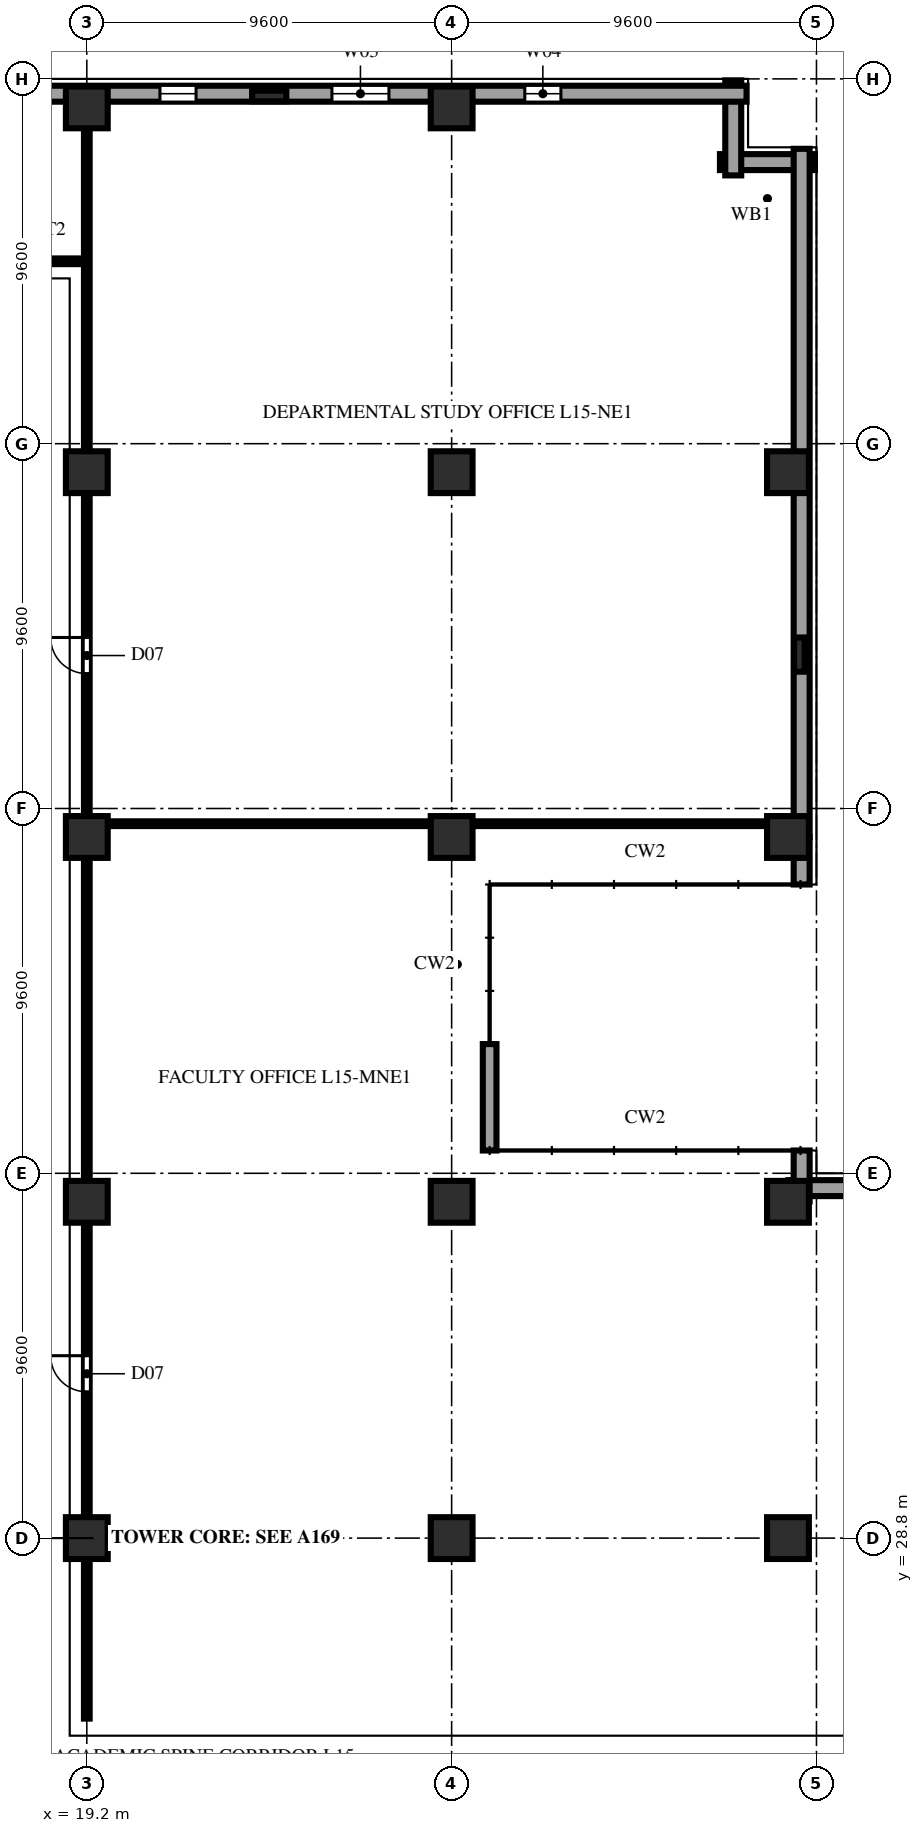
"""IFC4 building model, lengths in metres.
Left out: names, types, materials, properties, quantities, classifications, styles, units other than length and angle.
Written with IfcOpenShell. Run it as: python <this file> out.ifc"""

import sys

from ifc_helpers import new_model, si_unit, direction, frame, frame_2d, origin, origin_2d, place, context, subcontext, project, spatial, rectangle, extrude, element, fill, save


model = new_model("IFC4")
c1 = context("Model", 3, precision=1e-05, world=origin(), true_north=direction((0.0, 1.0)))
c2 = subcontext(c1, "Body", "Model", "MODEL_VIEW")
j1 = project(units=[si_unit("LENGTHUNIT", "METRE"), si_unit("PLANEANGLEUNIT", "RADIAN")], contexts=[c1])
p1 = place(None, origin())
s1 = spatial("IfcSite", under=j1, at=p1, CompositionType="ELEMENT")
p2 = place(p1, origin())
s2 = spatial("IfcBuilding", under=s1, at=p2, CompositionType="ELEMENT")
p3 = place(p2, frame((0.0, 0.0, 62.2)))
s3 = spatial("IfcBuildingStorey", under=s2, at=p3, CompositionType="ELEMENT", Elevation=62.2)
for number, where, z_axis, x_axis in (
    (1, (19.2, 28.8, 0.0), (0.0, 0.0, 1.0), (1.0, 0.0, 0.0)),
    (2, (19.2, 37.65, 0.0), (0.0, 0.0, 1.0), (1.0, 0.0, 0.0)),
    (3, (19.2, 47.25, 0.0), (0.0, 0.0, 1.0), (1.0, 0.0, 0.0)),
    (4, (19.2, 56.85, 0.0), (0.0, 0.0, 1.0), (1.0, 0.0, 0.0)),
    (5, (19.2, 66.45, 0.0), (0.0, 0.0, 1.0), (1.0, 0.0, 0.0)),
    (6, (28.8, 28.8, 0.0), (0.0, 0.0, 1.0), (1.0, 0.0, 0.0)),
    (7, (28.8, 37.65, 0.0), (0.0, 0.0, 1.0), (1.0, 0.0, 0.0)),
    (8, (28.8, 47.25, 0.0), (0.0, 0.0, 1.0), (1.0, 0.0, 0.0)),
    (9, (28.8, 56.85, 0.0), (0.0, 0.0, 1.0), (1.0, 0.0, 0.0)),
    (10, (28.8, 66.45, 0.0), (0.0, 0.0, 1.0), (1.0, 0.0, 0.0)),
    (11, (37.65, 28.8, 0.0), (0.0, 0.0, 1.0), (1.0, 0.0, 0.0)),
    (12, (37.65, 37.65, 0.0), (0.0, 0.0, 1.0), (1.0, 0.0, 0.0)),
    (13, (37.65, 47.25, 0.0), (0.0, 0.0, 1.0), (1.0, 0.0, 0.0)),
    (14, (37.65, 56.85, 0.0), (0.0, 0.0, 1.0), (1.0, 0.0, 0.0)),
):
    element("IfcColumn", number, at=place(p3, frame(where, z_axis=z_axis, x_axis=x_axis)), inside=s3, PredefinedType="COLUMN", context=c2, shape_type="SweptSolid", body=[
        extrude(rectangle(XDim=1.1, YDim=1.1, at=origin_2d()), origin(), (0.0, 0.0, 1.0), 3.8),
    ])
for number, where, z_axis, x_axis in (
    (15, (24.0, 66.75, 0.0), (0.0, 0.0, 1.0), (1.0, 0.0, 0.0)),
    (16, (37.95, 52.05, 0.0), (0.0, 0.0, 1.0), (0.0, 1.0, 0.0)),
):
    element("IfcColumn", number, at=place(p3, frame(where, z_axis=z_axis, x_axis=x_axis)), inside=s3, PredefinedType="PILASTER", context=c2, shape_type="SweptSolid", body=[
        extrude(rectangle(XDim=0.9, YDim=0.28, at=origin_2d()), origin(), (0.0, 0.0, 1.0), 3.8),
    ])
p4 = place(p3, frame((65.36, 38.01, 0.0), z_axis=(0.0, 0.0, 1.0), x_axis=(-1.0, 0.0, 0.0)))
e17 = element("IfcWall", 17, at=p4, inside=s3, PredefinedType="SOLIDWALL", context=c2, shape_type="SweptSolid", body=[
    extrude(rectangle(XDim=27.7, YDim=0.42, at=frame_2d((13.85, 0.0))), origin(), (0.0, 0.0, 1.0), 3.54),
])
p5 = place(p3, frame((38.01, 37.66, 0.0), z_axis=(0.0, 0.0, 1.0), x_axis=(0.0, 1.0, 0.0)))
e18 = element("IfcWall", 18, at=p5, inside=s3, PredefinedType="SOLIDWALL", context=c2, shape_type="SweptSolid", body=[
    extrude(rectangle(XDim=1.34, YDim=0.42, at=frame_2d((0.67, 0.0))), origin(), (0.0, 0.0, 1.0), 2.14),
])
p6 = place(p3, frame((38.01, 46.0, 0.0), z_axis=(0.0, 0.0, 1.0), x_axis=(0.0, 1.0, 0.0)))
e19 = element("IfcWall", 19, at=p6, inside=s3, PredefinedType="SOLIDWALL", context=c2, shape_type="SweptSolid", body=[
    extrude(rectangle(XDim=1.25, YDim=0.42, at=frame_2d((0.625, 0.0))), origin(), (0.0, 0.0, 1.0), 2.14),
])
for number, where, z_axis, x_axis in (
    (20, (38.36, 65.01, 0.0), (0.0, 0.0, 1.0), (-1.0, 0.0, 0.0)),
    (21, (36.21, 64.66, 0.0), (0.0, 0.0, 1.0), (0.0, 1.0, 0.0)),
):
    element("IfcWall", number, at=place(p3, frame(where, z_axis=z_axis, x_axis=x_axis)), inside=s3, PredefinedType="SOLIDWALL", context=c2, shape_type="SweptSolid", body=[
        extrude(rectangle(XDim=2.5, YDim=0.42, at=frame_2d((1.25, 0.0))), origin(), (0.0, 0.0, 1.0), 3.54),
    ])
p7 = place(p3, frame((36.56, 66.81, 0.0), z_axis=(0.0, 0.0, 1.0), x_axis=(-1.0, 0.0, 0.0)))
e22 = element("IfcWall", 22, at=p7, inside=s3, PredefinedType="SOLIDWALL", context=c2, shape_type="SweptSolid", body=[
    extrude(rectangle(XDim=34.72, YDim=0.42, at=frame_2d((17.36, 0.0))), origin(), (0.0, 0.0, 1.0), 3.54),
])
p8 = place(p7, frame((4.885, 0.0, 0.9)))
e23 = element("IfcOpeningElement", 23, at=p8, cuts=e22, PredefinedType="OPENING", context=c2, shape_type="SweptSolid", body=[
    extrude(rectangle(XDim=0.95, YDim=1.85, at=frame_2d((0.475, 0.925))), frame((0.0, 0.222, 0.0), z_axis=(0.0, -1.0, 0.0), x_axis=(1.0, 0.0, 0.0)), (0.0, 0.0, 1.0), 0.444),
])
p9 = place(p7, frame((9.41, 0.0, 0.9)))
e24 = element("IfcOpeningElement", 24, at=p9, cuts=e22, PredefinedType="OPENING", context=c2, shape_type="SweptSolid", body=[
    extrude(rectangle(XDim=1.5, YDim=1.85, at=frame_2d((0.75, 0.925))), frame((0.0, 0.222, 0.0), z_axis=(0.0, -1.0, 0.0), x_axis=(1.0, 0.0, 0.0)), (0.0, 0.0, 1.0), 0.444),
])
p10 = place(p7, frame((14.485, 0.0, 0.9)))
e25 = element("IfcOpeningElement", 25, at=p10, cuts=e22, PredefinedType="OPENING", context=c2, shape_type="SweptSolid", body=[
    extrude(rectangle(XDim=0.95, YDim=1.85, at=frame_2d((0.475, 0.925))), frame((0.0, 0.222, 0.0), z_axis=(0.0, -1.0, 0.0), x_axis=(1.0, 0.0, 0.0)), (0.0, 0.0, 1.0), 0.444),
])
p11 = place(p3, frame((29.8, 39.0, 0.0), z_axis=(0.0, 0.0, 1.0), x_axis=(0.0, 1.0, 0.0)))
e26 = element("IfcWall", 26, at=p11, inside=s3, PredefinedType="SOLIDWALL", context=c2, shape_type="SweptSolid", body=[
    extrude(rectangle(XDim=2.8, YDim=0.36, at=frame_2d((1.4, 0.0))), origin(), (0.0, 0.0, 1.0), 3.54),
])
p12 = place(p3, frame((17.05, 62.4, 0.0), z_axis=(0.0, 0.0, 1.0), x_axis=(1.0, 0.0, 0.0)))
e27 = element("IfcWall", 27, at=p12, inside=s3, PredefinedType="PARTITIONING", context=c2, shape_type="SweptSolid", body=[
    extrude(rectangle(XDim=2.15, YDim=0.15, at=frame_2d((1.075, 0.0))), origin(), (0.0, 0.0, 1.0), 3.54),
])
p13 = place(p3, frame((19.2, 24.05, 0.0), z_axis=(0.0, 0.0, 1.0), x_axis=(0.0, 1.0, 0.0)))
e28 = element("IfcWall", 28, at=p13, inside=s3, PredefinedType="PARTITIONING", context=c2, shape_type="SweptSolid", body=[
    extrude(rectangle(XDim=23.2, YDim=0.15, at=frame_2d((11.6, 0.0))), origin(), (0.0, 0.0, 1.0), 2.923),
])
p14 = place(p13, frame((8.6, 0.0, 0.0)))
e29 = element("IfcOpeningElement", 29, at=p14, cuts=e28, PredefinedType="OPENING", context=c2, shape_type="SweptSolid", body=[
    extrude(rectangle(XDim=0.95, YDim=2.15, at=frame_2d((0.475, 1.075))), frame((0.0, 0.087, 0.0), z_axis=(0.0, -1.0, 0.0), x_axis=(1.0, 0.0, 0.0)), (0.0, 0.0, 1.0), 0.174),
])
p15 = place(p3, frame((19.2, 47.25, 0.0), z_axis=(0.0, 0.0, 1.0), x_axis=(0.0, 1.0, 0.0)))
e30 = element("IfcWall", 30, at=p15, inside=s3, PredefinedType="PARTITIONING", context=c2, shape_type="SweptSolid", body=[
    extrude(rectangle(XDim=0.35, YDim=0.15, at=frame_2d((0.175, 0.0))), origin(), (0.0, 0.0, 1.0), 3.54),
])
p16 = place(p3, frame((19.2, 47.6, 0.0), z_axis=(0.0, 0.0, 1.0), x_axis=(1.0, 0.0, 0.0)))
e31 = element("IfcWall", 31, at=p16, inside=s3, PredefinedType="PARTITIONING", context=c2, shape_type="SweptSolid", body=[
    extrude(rectangle(XDim=18.98, YDim=0.125, at=frame_2d((9.49, 0.0))), origin(), (0.0, 0.0, 1.0), 3.54),
])
p17 = place(p3, frame((19.2, 47.6, 0.0), z_axis=(0.0, 0.0, 1.0), x_axis=(0.0, 1.0, 0.0)))
e32 = element("IfcWall", 32, at=p17, inside=s3, PredefinedType="PARTITIONING", context=c2, shape_type="SweptSolid", body=[
    extrude(rectangle(XDim=18.85, YDim=0.15, at=frame_2d((9.425, 0.0))), origin(), (0.0, 0.0, 1.0), 2.923),
])
p18 = place(p17, frame((3.95, 0.0, 0.0)))
e33 = element("IfcOpeningElement", 33, at=p18, cuts=e32, PredefinedType="OPENING", context=c2, shape_type="SweptSolid", body=[
    extrude(rectangle(XDim=0.95, YDim=2.15, at=frame_2d((0.475, 1.075))), frame((0.0, 0.087, 0.0), z_axis=(0.0, -1.0, 0.0), x_axis=(1.0, 0.0, 0.0)), (0.0, 0.0, 1.0), 0.174),
])
p19 = place(p3, frame((19.2, 66.45, 0.0), z_axis=(0.0, 0.0, 1.0), x_axis=(0.0, 1.0, 0.0)))
e34 = element("IfcWall", 34, at=p19, inside=s3, PredefinedType="PARTITIONING", context=c2, shape_type="SweptSolid", body=[
    extrude(rectangle(XDim=0.53, YDim=0.15, at=frame_2d((0.265, 0.0))), origin(), (0.0, 0.0, 1.0), 3.54),
])
p20 = place(p3, frame((38.01, 47.25, 0.0), z_axis=(0.0, 0.0, 1.0), x_axis=(0.0, 1.0, 0.0)))
e35 = element("IfcWall", 35, at=p20, inside=s3, PredefinedType="SOLIDWALL", context=c2, shape_type="SweptSolid", body=[
    extrude(rectangle(XDim=18.11, YDim=0.42, at=frame_2d((9.055, 0.0))), origin(), (0.0, 0.0, 1.0), 3.54),
])
p21 = place(p8, origin())
e36 = element("IfcWindow", 36, at=p21, inside=s3, PartitioningType="SINGLE_PANEL", PredefinedType="WINDOW", context=c2, shape_type="SweptSolid", body=[
    extrude(rectangle(XDim=0.95, YDim=1.85, at=frame_2d((0.475, 0.925))), frame((0.0, 0.11, 0.0), z_axis=(0.0, -1.0, 0.0), x_axis=(1.0, 0.0, 0.0)), (0.0, 0.0, 1.0), 0.06),
])
fill(e23, e36)
p22 = place(p9, origin())
e37 = element("IfcWindow", 37, at=p22, inside=s3, PartitioningType="DOUBLE_PANEL_VERTICAL", PredefinedType="WINDOW", context=c2, shape_type="SweptSolid", body=[
    extrude(rectangle(XDim=1.5, YDim=1.85, at=frame_2d((0.75, 0.925))), frame((0.0, 0.11, 0.0), z_axis=(0.0, -1.0, 0.0), x_axis=(1.0, 0.0, 0.0)), (0.0, 0.0, 1.0), 0.06),
])
fill(e24, e37)
p23 = place(p10, origin())
e38 = element("IfcWindow", 38, at=p23, inside=s3, PartitioningType="SINGLE_PANEL", PredefinedType="WINDOW", context=c2, shape_type="SweptSolid", body=[
    extrude(rectangle(XDim=0.95, YDim=1.85, at=frame_2d((0.475, 0.925))), frame((0.0, 0.11, 0.0), z_axis=(0.0, -1.0, 0.0), x_axis=(1.0, 0.0, 0.0)), (0.0, 0.0, 1.0), 0.06),
])
fill(e25, e38)
p24 = place(p14, origin())
e39 = element("IfcDoor", 39, at=p24, inside=s3, OperationType="SINGLE_SWING_RIGHT", PredefinedType="DOOR", context=c2, shape_type="SweptSolid", body=[
    extrude(rectangle(XDim=0.95, YDim=2.15, at=frame_2d((0.475, 1.075))), frame((0.0, 0.025, 0.0), z_axis=(0.0, -1.0, 0.0), x_axis=(1.0, 0.0, 0.0)), (0.0, 0.0, 1.0), 0.05),
])
fill(e29, e39)
p25 = place(p18, origin())
e40 = element("IfcDoor", 40, at=p25, inside=s3, OperationType="SINGLE_SWING_RIGHT", PredefinedType="DOOR", context=c2, shape_type="SweptSolid", body=[
    extrude(rectangle(XDim=0.95, YDim=2.15, at=frame_2d((0.475, 1.075))), frame((0.0, 0.025, 0.0), z_axis=(0.0, -1.0, 0.0), x_axis=(1.0, 0.0, 0.0)), (0.0, 0.0, 1.0), 0.05),
])
fill(e33, e40)
save(model, sys.argv[1])
